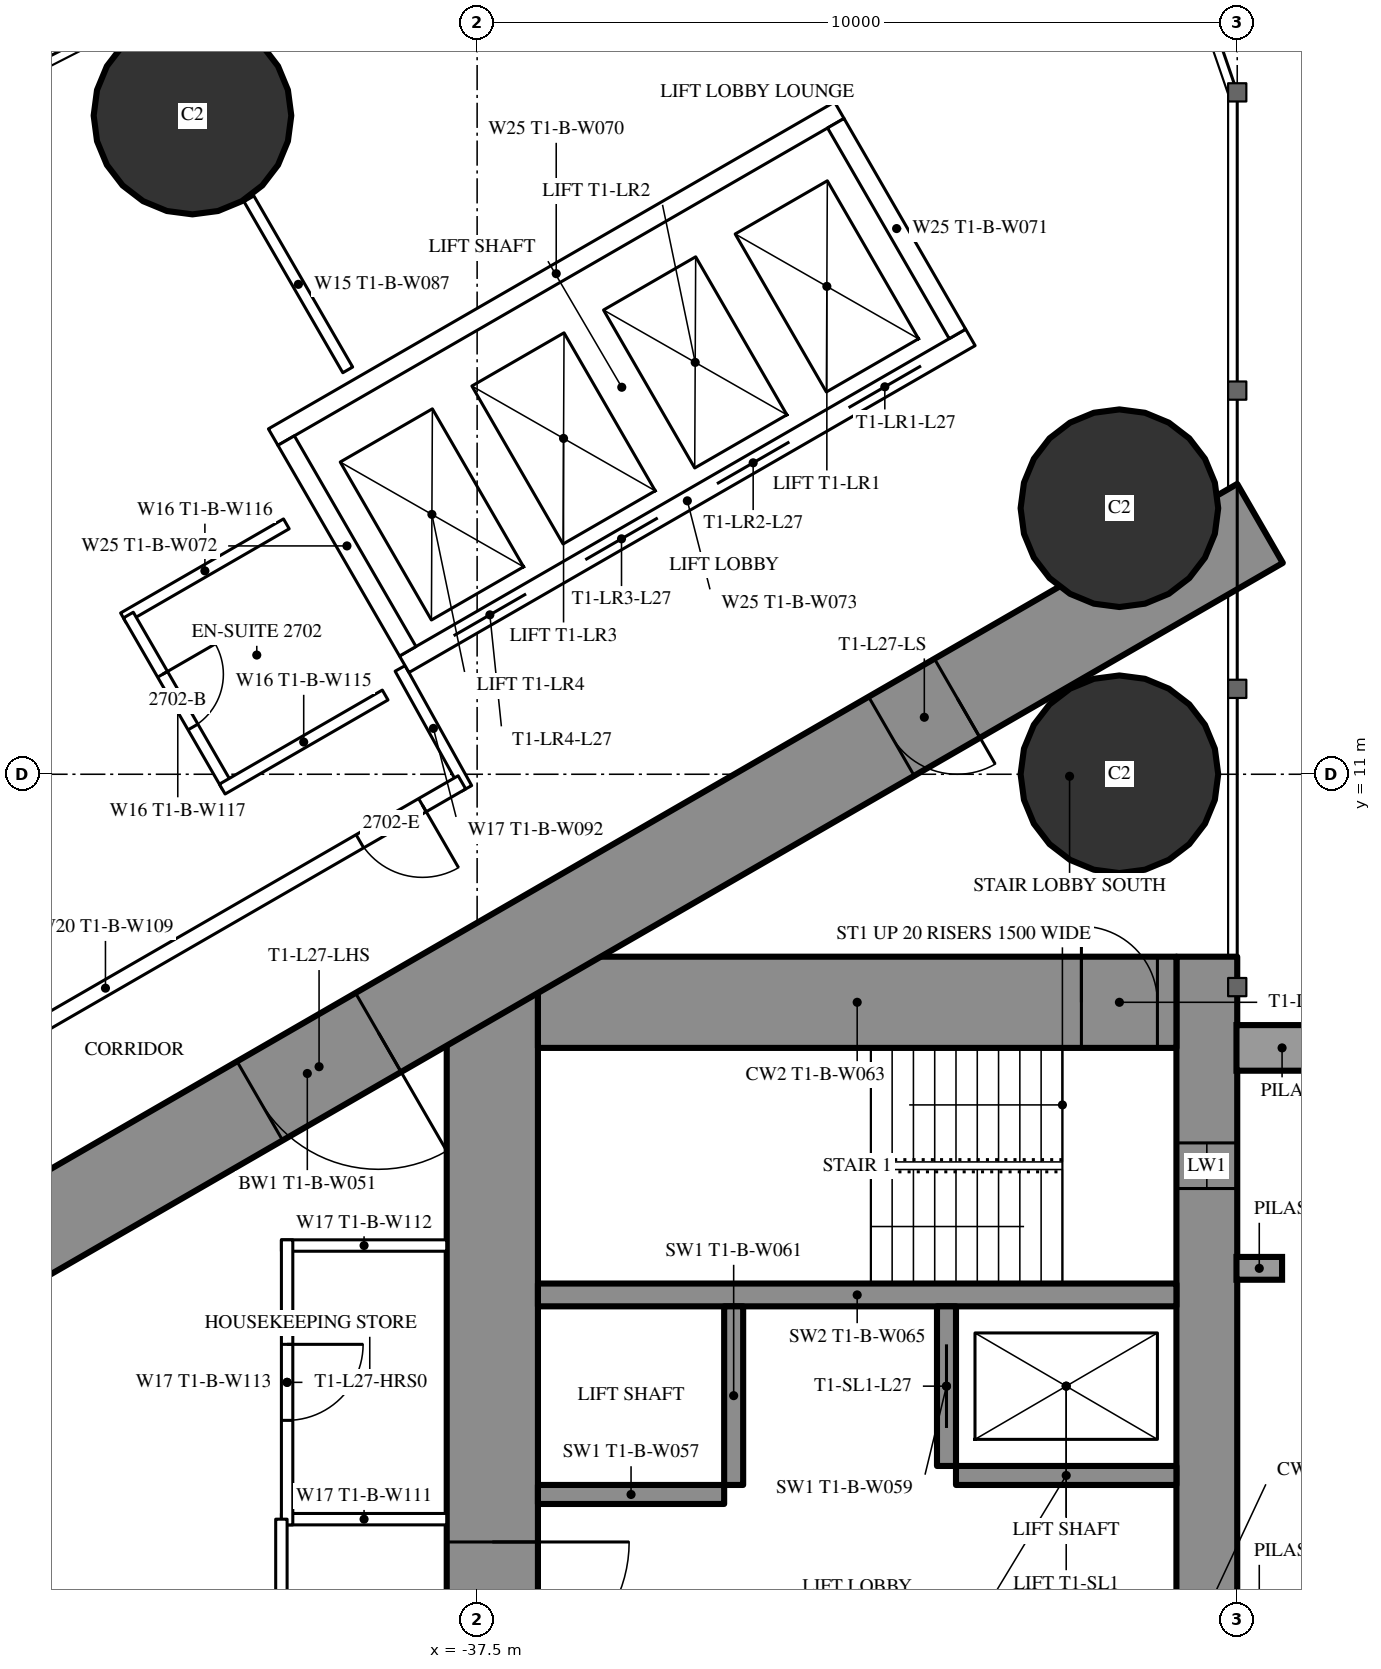
"""IFC4 building model, lengths in metres.
Left out: names, types, materials, properties, quantities, classifications, styles, units other than length and angle.
Written with IfcOpenShell. Run it as: python <this file> out.ifc"""

import sys

from ifc_helpers import new_model, si_unit, direction, frame, frame_2d, origin, origin_2d, place, context, subcontext, project, spatial, rectangle, hollow_circle, extrude, element, fill, save


model = new_model("IFC4")
c1 = context("Model", 3, precision=1e-05, world=origin(), true_north=direction((0.0, 1.0)))
c2 = subcontext(c1, "Body", "Model", "MODEL_VIEW")
j1 = project(units=[si_unit("LENGTHUNIT", "METRE"), si_unit("PLANEANGLEUNIT", "RADIAN")], contexts=[c1])
p1 = place(None, origin())
s1 = spatial("IfcSite", under=j1, at=p1, CompositionType="ELEMENT")
p2 = place(p1, origin())
s2 = spatial("IfcBuilding", under=s1, at=p2, CompositionType="ELEMENT")
p3 = place(p2, frame((0.0, 0.0, 104.6)))
s3 = spatial("IfcBuildingStorey", under=s2, at=p3, CompositionType="ELEMENT", Elevation=104.6)
for number, where, z_axis, x_axis in (
    (1, (-29.05, 11.0, 0.0), (0.0, 0.0, 1.0), (1.0, 0.0, 0.0)),
    (2, (-29.05, 14.5, 0.0), (0.0, 0.0, 1.0), (1.0, 0.0, 0.0)),
    (3, (-41.245, 19.666, 0.0), (0.0, 0.0, 1.0), (1.0, 0.0, 0.0)),
):
    element("IfcColumn", number, at=place(p3, frame(where, z_axis=z_axis, x_axis=x_axis)), inside=s3, PredefinedType="COLUMN", context=c2, shape_type="SweptSolid", body=[
        extrude(hollow_circle(Radius=1.3, WallThickness=0.1, at=origin_2d()), origin(), (0.0, 0.0, 1.0), 3.5),
    ])
p4 = place(p3, frame((-27.9, 8.6, 0.0), z_axis=(0.0, 0.0, 1.0), x_axis=(0.0, -1.0, 0.0)))
e4 = element("IfcWall", 4, at=p4, inside=s3, PredefinedType="SHEAR", context=c2, shape_type="SweptSolid", body=[
    extrude(rectangle(XDim=17.2, YDim=0.8, at=frame_2d((8.6, 0.0))), origin(), (0.0, 0.0, 1.0), 3.5),
])
p5 = place(p4, frame((2.45, 0.0, 0.6)))
e5 = element("IfcOpeningElement", 5, at=p5, cuts=e4, PredefinedType="OPENING", context=c2, shape_type="SweptSolid", body=[
    extrude(rectangle(XDim=0.6, YDim=2.1, at=frame_2d((0.3, 1.05))), frame((0.0, 0.41, 0.0), z_axis=(0.0, -1.0, 0.0), x_axis=(1.0, 0.0, 0.0)), (0.0, 0.0, 1.0), 0.82),
])
p6 = place(p4, frame((14.15, 0.0, 0.6)))
e6 = element("IfcOpeningElement", 6, at=p6, cuts=e4, PredefinedType="OPENING", context=c2, shape_type="SweptSolid", body=[
    extrude(rectangle(XDim=0.6, YDim=2.1, at=frame_2d((0.3, 1.05))), frame((0.0, 0.41, 0.0), z_axis=(0.0, -1.0, 0.0), x_axis=(1.0, 0.0, 0.0)), (0.0, 0.0, 1.0), 0.82),
])
p7 = place(p3, frame((-37.3, 8.6, 0.0), z_axis=(0.0, 0.0, 1.0), x_axis=(0.0, -1.0, 0.0)))
e7 = element("IfcWall", 7, at=p7, inside=s3, PredefinedType="SHEAR", context=c2, shape_type="SweptSolid", body=[
    extrude(rectangle(XDim=17.2, YDim=1.2, at=frame_2d((8.6, 0.0))), origin(), (0.0, 0.0, 1.0), 3.5),
])
p8 = place(p7, frame((7.7, 0.0, 0.0)))
e8 = element("IfcOpeningElement", 8, at=p8, cuts=e7, PredefinedType="OPENING", context=c2, shape_type="SweptSolid", body=[
    extrude(rectangle(XDim=1.8, YDim=2.2, at=frame_2d((0.9, 1.1))), frame((0.0, 0.61, 0.0), z_axis=(0.0, -1.0, 0.0), x_axis=(1.0, 0.0, 0.0)), (0.0, 0.0, 1.0), 1.22),
])
p9 = place(p3, frame((-28.3, 8.0, 0.0), z_axis=(0.0, 0.0, 1.0), x_axis=(-1.0, 0.0, 0.0)))
e9 = element("IfcWall", 9, at=p9, inside=s3, PredefinedType="SHEAR", context=c2, shape_type="SweptSolid", body=[
    extrude(rectangle(XDim=8.4, YDim=1.2, at=frame_2d((4.2, 0.0))), origin(), (0.0, 0.0, 1.0), 3.5),
])
p10 = place(p9, frame((0.25, 0.0, 0.0)))
e10 = element("IfcOpeningElement", 10, at=p10, cuts=e9, PredefinedType="OPENING", context=c2, shape_type="SweptSolid", body=[
    extrude(rectangle(XDim=1.0, YDim=2.2, at=frame_2d((0.5, 1.1))), frame((0.0, 0.61, 0.0), z_axis=(0.0, -1.0, 0.0), x_axis=(1.0, 0.0, 0.0)), (0.0, 0.0, 1.0), 1.22),
])
p11 = place(p3, frame((-28.3, 4.15, 0.0), z_axis=(0.0, 0.0, 1.0), x_axis=(-1.0, 0.0, 0.0)))
e11 = element("IfcWall", 11, at=p11, inside=s3, PredefinedType="SHEAR", context=c2, shape_type="SweptSolid", body=[
    extrude(rectangle(XDim=8.4, YDim=0.3, at=frame_2d((4.2, 0.0))), origin(), (0.0, 0.0, 1.0), 3.5),
])
p12 = place(p3, frame((-31.325, 4.0, 0.0), z_axis=(0.0, 0.0, 1.0), x_axis=(0.0, -1.0, 0.0)))
e12 = element("IfcWall", 12, at=p12, inside=s3, PredefinedType="SHEAR", context=c2, shape_type="SweptSolid", body=[
    extrude(rectangle(XDim=2.1, YDim=0.25, at=frame_2d((1.05, 0.0))), origin(), (0.0, 0.0, 1.0), 3.5),
])
p13 = place(p12, frame((0.5, 0.0, 0.0)))
e13 = element("IfcOpeningElement", 13, at=p13, cuts=e12, PredefinedType="OPENING", context=c2, shape_type="SweptSolid", body=[
    extrude(rectangle(XDim=1.1, YDim=2.2, at=frame_2d((0.55, 1.1))), frame((0.0, 0.135, 0.0), z_axis=(0.0, -1.0, 0.0), x_axis=(1.0, 0.0, 0.0)), (0.0, 0.0, 1.0), 0.27),
])
p14 = place(p3, frame((-34.125, 4.0, 0.0), z_axis=(0.0, 0.0, 1.0), x_axis=(0.0, -1.0, 0.0)))
e14 = element("IfcWall", 14, at=p14, inside=s3, PredefinedType="SHEAR", context=c2, shape_type="SweptSolid", body=[
    extrude(rectangle(XDim=2.35, YDim=0.25, at=frame_2d((1.175, 0.0))), origin(), (0.0, 0.0, 1.0), 3.5),
])
p15 = place(p3, frame((-28.3, 1.775, 0.0), z_axis=(0.0, 0.0, 1.0), x_axis=(-1.0, 0.0, 0.0)))
e15 = element("IfcWall", 15, at=p15, inside=s3, PredefinedType="SHEAR", context=c2, shape_type="SweptSolid", body=[
    extrude(rectangle(XDim=2.9, YDim=0.25, at=frame_2d((1.45, 0.0))), origin(), (0.0, 0.0, 1.0), 3.5),
])
p16 = place(p3, frame((-34.25, 1.525, 0.0), z_axis=(0.0, 0.0, 1.0), x_axis=(-1.0, 0.0, 0.0)))
e16 = element("IfcWall", 16, at=p16, inside=s3, PredefinedType="SHEAR", context=c2, shape_type="SweptSolid", body=[
    extrude(rectangle(XDim=2.45, YDim=0.25, at=frame_2d((1.225, 0.0))), origin(), (0.0, 0.0, 1.0), 3.5),
])
p17 = place(p3, frame((-27.2, 14.3, 0.0), z_axis=(0.0, 0.0, 1.0), x_axis=(-0.866026593062, -0.499997940104, 0.0)))
e17 = element("IfcWall", 17, at=p17, inside=s3, PredefinedType="SHEAR", context=c2, shape_type="SweptSolid", body=[
    extrude(rectangle(XDim=28.946, YDim=1.2, at=frame_2d((14.473, 0.0))), origin(), (0.0, 0.0, 1.0), 3.5),
])
p18 = place(p17, frame((4.6, 0.0, 0.0)))
e18 = element("IfcOpeningElement", 18, at=p18, cuts=e17, PredefinedType="OPENING", context=c2, shape_type="SweptSolid", body=[
    extrude(rectangle(XDim=1.0, YDim=2.2, at=frame_2d((0.5, 1.1))), frame((0.0, 0.61, 0.0), z_axis=(0.0, -1.0, 0.0), x_axis=(1.0, 0.0, 0.0)), (0.0, 0.0, 1.0), 1.22),
])
p19 = place(p17, frame((13.395, 0.0, 0.0)))
e19 = element("IfcOpeningElement", 19, at=p19, cuts=e17, PredefinedType="OPENING", context=c2, shape_type="SweptSolid", body=[
    extrude(rectangle(XDim=1.8, YDim=2.2, at=frame_2d((0.9, 1.1))), frame((0.0, 0.61, 0.0), z_axis=(0.0, -1.0, 0.0), x_axis=(1.0, 0.0, 0.0)), (0.0, 0.0, 1.0), 1.22),
])
p20 = place(p3, frame((-39.202, 16.32, 0.0), z_axis=(0.0, 0.0, 1.0), x_axis=(-0.499947391036, 0.866055775454, 0.0)))
e20 = element("IfcWall", 20, at=p20, inside=s3, PredefinedType="PARTITIONING", context=c2, shape_type="SweptSolid", body=[
    extrude(rectangle(XDim=2.599, YDim=0.15, at=frame_2d((1.3, 0.0))), origin(), (0.0, 0.0, 1.0), 3.25),
])
p21 = place(p3, frame((-38.513, 12.392, 0.0), z_axis=(0.0, 0.0, 1.0), x_axis=(0.485585508183, -0.874189175317, 0.0)))
e21 = element("IfcWall", 21, at=p21, inside=s3, PredefinedType="PARTITIONING", context=c2, shape_type="SweptSolid", body=[
    extrude(rectangle(XDim=1.805, YDim=0.15, at=frame_2d((0.902, 0.0))), origin(), (0.0, 0.0, 1.0), 3.25),
])
p22 = place(p3, frame((-37.7, 10.894, 0.0), z_axis=(0.0, 0.0, 1.0), x_axis=(-0.866027551079, -0.499996280759, 0.0)))
e22 = element("IfcWall", 22, at=p22, inside=s3, PredefinedType="PARTITIONING", context=c2, shape_type="SweptSolid", body=[
    extrude(rectangle(XDim=10.831, YDim=0.2, at=frame_2d((5.415, 0.0))), origin(), (0.0, 0.0, 1.0), 3.25),
])
p23 = place(p22, frame((0.6, 0.0, 0.0)))
e23 = element("IfcOpeningElement", 23, at=p23, cuts=e22, PredefinedType="OPENING", context=c2, shape_type="SweptSolid", body=[
    extrude(rectangle(XDim=0.95, YDim=2.2, at=frame_2d((0.475, 1.1))), frame((0.0, 0.11, 0.0), z_axis=(0.0, -1.0, 0.0), x_axis=(1.0, 0.0, 0.0)), (0.0, 0.0, 1.0), 0.22),
])
p24 = place(p3, frame((-40.01, 14.294, 0.0), z_axis=(0.0, 0.0, 1.0), x_axis=(-0.866031185235, -0.4999899861, 0.0)))
e24 = element("IfcWall", 24, at=p24, inside=s3, PredefinedType="PARTITIONING", context=c2, shape_type="SweptSolid", body=[
    extrude(rectangle(XDim=2.475, YDim=0.15, at=frame_2d((1.238, 0.0))), origin(), (0.0, 0.0, 1.0), 3.25),
])
p25 = place(p3, frame((-40.788, 10.843, 0.0), z_axis=(0.0, 0.0, 1.0), x_axis=(-0.500006934395, 0.866021400173, 0.0)))
e25 = element("IfcWall", 25, at=p25, inside=s3, PredefinedType="PARTITIONING", context=c2, shape_type="SweptSolid", body=[
    extrude(rectangle(XDim=2.6, YDim=0.15, at=frame_2d((1.3, 0.0))), origin(), (0.0, 0.0, 1.0), 3.25),
])
p26 = place(p25, frame((0.9, 0.0, 0.0)))
e26 = element("IfcOpeningElement", 26, at=p26, cuts=e25, PredefinedType="OPENING", context=c2, shape_type="SweptSolid", body=[
    extrude(rectangle(XDim=0.8, YDim=2.2, at=frame_2d((0.4, 1.1))), frame((0.0, 0.085, 0.0), z_axis=(0.0, -1.0, 0.0), x_axis=(1.0, 0.0, 0.0)), (0.0, 0.0, 1.0), 0.17),
])
p27 = place(p3, frame((-38.71, 12.042, 0.0), z_axis=(0.0, 0.0, 1.0), x_axis=(-0.86604923931, -0.499958713387, 0.0)))
e27 = element("IfcWall", 27, at=p27, inside=s3, PredefinedType="PARTITIONING", context=c2, shape_type="SweptSolid", body=[
    extrude(rectangle(XDim=2.475, YDim=0.15, at=frame_2d((1.237, 0.0))), origin(), (0.0, 0.0, 1.0), 3.25),
])
for number, where, z_axis, x_axis in (
    (28, (-37.9, 1.2, 0.0), (0.0, 0.0, 1.0), (-1.0, 0.0, 0.0)),
    (29, (-37.9, 4.8, 0.0), (0.0, 0.0, 1.0), (-1.0, 0.0, 0.0)),
):
    element("IfcWall", number, at=place(p3, frame(where, z_axis=z_axis, x_axis=x_axis)), inside=s3, PredefinedType="PARTITIONING", context=c2, shape_type="SweptSolid", body=[
        extrude(rectangle(XDim=2.175, YDim=0.15, at=frame_2d((1.087, 0.0))), origin(), (0.0, 0.0, 1.0), 3.25),
    ])
p28 = place(p3, frame((-40.0, 4.875, 0.0), z_axis=(0.0, 0.0, 1.0), x_axis=(0.0, -1.0, 0.0)))
e30 = element("IfcWall", 30, at=p28, inside=s3, PredefinedType="PARTITIONING", context=c2, shape_type="SweptSolid", body=[
    extrude(rectangle(XDim=3.75, YDim=0.15, at=frame_2d((1.875, 0.0))), origin(), (0.0, 0.0, 1.0), 3.25),
])
p29 = place(p28, frame((1.375, 0.0, 0.0)))
e31 = element("IfcOpeningElement", 31, at=p29, cuts=e30, PredefinedType="OPENING", context=c2, shape_type="SweptSolid", body=[
    extrude(rectangle(XDim=1.0, YDim=2.2, at=frame_2d((0.5, 1.1))), frame((0.0, 0.085, 0.0), z_axis=(0.0, -1.0, 0.0), x_axis=(1.0, 0.0, 0.0)), (0.0, 0.0, 1.0), 0.17),
])
p30 = place(p3, frame((-40.075, 1.2, 0.0), z_axis=(0.0, 0.0, 1.0), x_axis=(0.0, -1.0, 0.0)))
e32 = element("IfcWall", 32, at=p30, inside=s3, PredefinedType="PARTITIONING", context=c2, shape_type="SweptSolid", body=[
    extrude(rectangle(XDim=7.374, YDim=0.15, at=frame_2d((3.687, 0.0))), origin(), (0.0, 0.0, 1.0), 3.25),
])
p31 = place(p30, frame((2.787, 0.0, 0.0)))
e33 = element("IfcOpeningElement", 33, at=p31, cuts=e32, PredefinedType="OPENING", context=c2, shape_type="SweptSolid", body=[
    extrude(rectangle(XDim=1.8, YDim=2.2, at=frame_2d((0.9, 1.1))), frame((0.0, 0.085, 0.0), z_axis=(0.0, -1.0, 0.0), x_axis=(1.0, 0.0, 0.0)), (0.0, 0.0, 1.0), 0.17),
])
p32 = place(p3, frame((-31.01, 16.747, 0.0), z_axis=(0.0, 0.0, 1.0), x_axis=(-0.866028165386, -0.499995216735, 0.0)))
e34 = element("IfcWall", 34, at=p32, inside=s3, PredefinedType="PARTITIONING", context=c2, shape_type="SweptSolid", body=[
    extrude(rectangle(XDim=8.6, YDim=0.25, at=frame_2d((4.3, 0.0))), origin(), (0.0, 0.0, 1.0), 3.25),
])
p33 = place(p32, frame((0.75, 0.0, 0.0)))
e35 = element("IfcOpeningElement", 35, at=p33, cuts=e34, PredefinedType="OPENING", context=c2, shape_type="SweptSolid", body=[
    extrude(rectangle(XDim=1.1, YDim=2.2, at=frame_2d((0.55, 1.1))), frame((0.0, 0.135, 0.0), z_axis=(0.0, -1.0, 0.0), x_axis=(1.0, 0.0, 0.0)), (0.0, 0.0, 1.0), 0.27),
])
p34 = place(p32, frame((2.75, 0.0, 0.0)))
e36 = element("IfcOpeningElement", 36, at=p34, cuts=e34, PredefinedType="OPENING", context=c2, shape_type="SweptSolid", body=[
    extrude(rectangle(XDim=1.1, YDim=2.2, at=frame_2d((0.55, 1.1))), frame((0.0, 0.135, 0.0), z_axis=(0.0, -1.0, 0.0), x_axis=(1.0, 0.0, 0.0)), (0.0, 0.0, 1.0), 0.27),
])
p35 = place(p32, frame((4.75, 0.0, 0.0)))
e37 = element("IfcOpeningElement", 37, at=p35, cuts=e34, PredefinedType="OPENING", context=c2, shape_type="SweptSolid", body=[
    extrude(rectangle(XDim=1.1, YDim=2.2, at=frame_2d((0.55, 1.1))), frame((0.0, 0.135, 0.0), z_axis=(0.0, -1.0, 0.0), x_axis=(1.0, 0.0, 0.0)), (0.0, 0.0, 1.0), 0.27),
])
p36 = place(p32, frame((6.75, 0.0, 0.0)))
e38 = element("IfcOpeningElement", 38, at=p36, cuts=e34, PredefinedType="OPENING", context=c2, shape_type="SweptSolid", body=[
    extrude(rectangle(XDim=1.1, YDim=2.2, at=frame_2d((0.55, 1.1))), frame((0.0, 0.135, 0.0), z_axis=(0.0, -1.0, 0.0), x_axis=(1.0, 0.0, 0.0)), (0.0, 0.0, 1.0), 0.27),
])
p37 = place(p3, frame((-32.736, 19.736, 0.0), z_axis=(0.0, 0.0, 1.0), x_axis=(-0.866028165386, -0.499995216735, 0.0)))
e39 = element("IfcWall", 39, at=p37, inside=s3, PredefinedType="PARTITIONING", context=c2, shape_type="SweptSolid", body=[
    extrude(rectangle(XDim=8.6, YDim=0.25, at=frame_2d((4.3, 0.0))), origin(), (0.0, 0.0, 1.0), 3.25),
])
p38 = place(p3, frame((-31.181, 16.793, 0.0), z_axis=(0.0, 0.0, 1.0), x_axis=(-0.499929347863, 0.866066190972, 0.0)))
e40 = element("IfcWall", 40, at=p38, inside=s3, PredefinedType="PARTITIONING", context=c2, shape_type="SweptSolid", body=[
    extrude(rectangle(XDim=3.201, YDim=0.25, at=frame_2d((1.6, 0.0))), origin(), (0.0, 0.0, 1.0), 3.25),
])
p39 = place(p3, frame((-38.413, 12.618, 0.0), z_axis=(0.0, 0.0, 1.0), x_axis=(-0.499872130319, 0.866099216793, 0.0)))
e41 = element("IfcWall", 41, at=p39, inside=s3, PredefinedType="PARTITIONING", context=c2, shape_type="SweptSolid", body=[
    extrude(rectangle(XDim=3.2, YDim=0.25, at=frame_2d((1.6, 0.0))), origin(), (0.0, 0.0, 1.0), 3.25),
])
p40 = place(p26, origin())
e42 = element("IfcDoor", 42, at=p40, inside=s3, OperationType="SINGLE_SWING_RIGHT", PredefinedType="DOOR", context=c2, shape_type="SweptSolid", body=[
    extrude(rectangle(XDim=0.8, YDim=2.2, at=frame_2d((0.4, 1.1))), frame((0.0, 0.025, 0.0), z_axis=(0.0, -1.0, 0.0), x_axis=(1.0, 0.0, 0.0)), (0.0, 0.0, 1.0), 0.05),
])
fill(e26, e42)
p41 = place(p23, origin())
e43 = element("IfcDoor", 43, at=p41, inside=s3, OperationType="SINGLE_SWING_LEFT", PredefinedType="DOOR", context=c2, shape_type="SweptSolid", body=[
    extrude(rectangle(XDim=0.95, YDim=2.2, at=frame_2d((0.475, 1.1))), frame((0.0, 0.025, 0.0), z_axis=(0.0, -1.0, 0.0), x_axis=(1.0, 0.0, 0.0)), (0.0, 0.0, 1.0), 0.05),
])
fill(e23, e43)
p42 = place(p29, origin())
e44 = element("IfcDoor", 44, at=p42, inside=s3, OperationType="SINGLE_SWING_LEFT", PredefinedType="DOOR", context=c2, shape_type="SweptSolid", body=[
    extrude(rectangle(XDim=1.0, YDim=2.2, at=frame_2d((0.5, 1.1))), frame((0.0, 0.025, 0.0), z_axis=(0.0, -1.0, 0.0), x_axis=(1.0, 0.0, 0.0)), (0.0, 0.0, 1.0), 0.05),
])
fill(e31, e44)
p43 = place(p18, origin())
e45 = element("IfcDoor", 45, at=p43, inside=s3, OperationType="SINGLE_SWING_LEFT", PredefinedType="DOOR", context=c2, shape_type="SweptSolid", body=[
    extrude(rectangle(XDim=1.0, YDim=2.2, at=frame_2d((0.5, 1.1))), frame((0.0, 0.025, 0.0), z_axis=(0.0, -1.0, 0.0), x_axis=(1.0, 0.0, 0.0)), (0.0, 0.0, 1.0), 0.05),
])
fill(e18, e45)
p44 = place(p19, origin())
e46 = element("IfcDoor", 46, at=p44, inside=s3, OperationType="DOUBLE_DOOR_SINGLE_SWING", PredefinedType="DOOR", context=c2, shape_type="SweptSolid", body=[
    extrude(rectangle(XDim=1.8, YDim=2.2, at=frame_2d((0.9, 1.1))), frame((0.0, 0.025, 0.0), z_axis=(0.0, -1.0, 0.0), x_axis=(1.0, 0.0, 0.0)), (0.0, 0.0, 1.0), 0.05),
])
fill(e19, e46)
p45 = place(p8, origin())
e47 = element("IfcDoor", 47, at=p45, inside=s3, OperationType="DOUBLE_DOOR_SINGLE_SWING", PredefinedType="DOOR", context=c2, shape_type="SweptSolid", body=[
    extrude(rectangle(XDim=1.8, YDim=2.2, at=frame_2d((0.9, 1.1))), frame((0.0, 0.025, 0.0), z_axis=(0.0, -1.0, 0.0), x_axis=(1.0, 0.0, 0.0)), (0.0, 0.0, 1.0), 0.05),
])
fill(e8, e47)
p46 = place(p10, origin())
e48 = element("IfcDoor", 48, at=p46, inside=s3, OperationType="SINGLE_SWING_RIGHT", PredefinedType="DOOR", context=c2, shape_type="SweptSolid", body=[
    extrude(rectangle(XDim=1.0, YDim=2.2, at=frame_2d((0.5, 1.1))), frame((0.0, 0.025, 0.0), z_axis=(0.0, -1.0, 0.0), x_axis=(1.0, 0.0, 0.0)), (0.0, 0.0, 1.0), 0.05),
])
fill(e10, e48)
p47 = place(p13, origin())
e49 = element("IfcDoor", 49, at=p47, inside=s3, OperationType="SLIDING_TO_LEFT", PredefinedType="USERDEFINED", context=c2, shape_type="SweptSolid", body=[
    extrude(rectangle(XDim=1.1, YDim=2.2, at=frame_2d((0.55, 1.1))), frame((0.0, 0.025, 0.0), z_axis=(0.0, -1.0, 0.0), x_axis=(1.0, 0.0, 0.0)), (0.0, 0.0, 1.0), 0.05),
])
fill(e13, e49)
p48 = place(p33, origin())
e50 = element("IfcDoor", 50, at=p48, inside=s3, OperationType="DOUBLE_DOOR_SLIDING", PredefinedType="USERDEFINED", context=c2, shape_type="SweptSolid", body=[
    extrude(rectangle(XDim=1.1, YDim=2.2, at=frame_2d((0.55, 1.1))), frame((0.0, 0.025, 0.0), z_axis=(0.0, -1.0, 0.0), x_axis=(1.0, 0.0, 0.0)), (0.0, 0.0, 1.0), 0.05),
])
fill(e35, e50)
p49 = place(p34, origin())
e51 = element("IfcDoor", 51, at=p49, inside=s3, OperationType="DOUBLE_DOOR_SLIDING", PredefinedType="USERDEFINED", context=c2, shape_type="SweptSolid", body=[
    extrude(rectangle(XDim=1.1, YDim=2.2, at=frame_2d((0.55, 1.1))), frame((0.0, 0.025, 0.0), z_axis=(0.0, -1.0, 0.0), x_axis=(1.0, 0.0, 0.0)), (0.0, 0.0, 1.0), 0.05),
])
fill(e36, e51)
p50 = place(p35, origin())
e52 = element("IfcDoor", 52, at=p50, inside=s3, OperationType="DOUBLE_DOOR_SLIDING", PredefinedType="USERDEFINED", context=c2, shape_type="SweptSolid", body=[
    extrude(rectangle(XDim=1.1, YDim=2.2, at=frame_2d((0.55, 1.1))), frame((0.0, 0.025, 0.0), z_axis=(0.0, -1.0, 0.0), x_axis=(1.0, 0.0, 0.0)), (0.0, 0.0, 1.0), 0.05),
])
fill(e37, e52)
p51 = place(p36, origin())
e53 = element("IfcDoor", 53, at=p51, inside=s3, OperationType="DOUBLE_DOOR_SLIDING", PredefinedType="USERDEFINED", context=c2, shape_type="SweptSolid", body=[
    extrude(rectangle(XDim=1.1, YDim=2.2, at=frame_2d((0.55, 1.1))), frame((0.0, 0.025, 0.0), z_axis=(0.0, -1.0, 0.0), x_axis=(1.0, 0.0, 0.0)), (0.0, 0.0, 1.0), 0.05),
])
fill(e38, e53)
p52 = place(p5, origin())
e54 = element("IfcWindow", 54, at=p52, inside=s3, PartitioningType="SINGLE_PANEL", PredefinedType="WINDOW", context=c2, shape_type="SweptSolid", body=[
    extrude(rectangle(XDim=0.6, YDim=2.1, at=frame_2d((0.3, 1.05))), frame((0.0, 0.03, 0.0), z_axis=(0.0, -1.0, 0.0), x_axis=(1.0, 0.0, 0.0)), (0.0, 0.0, 1.0), 0.06),
])
fill(e5, e54)
save(model, sys.argv[1])
